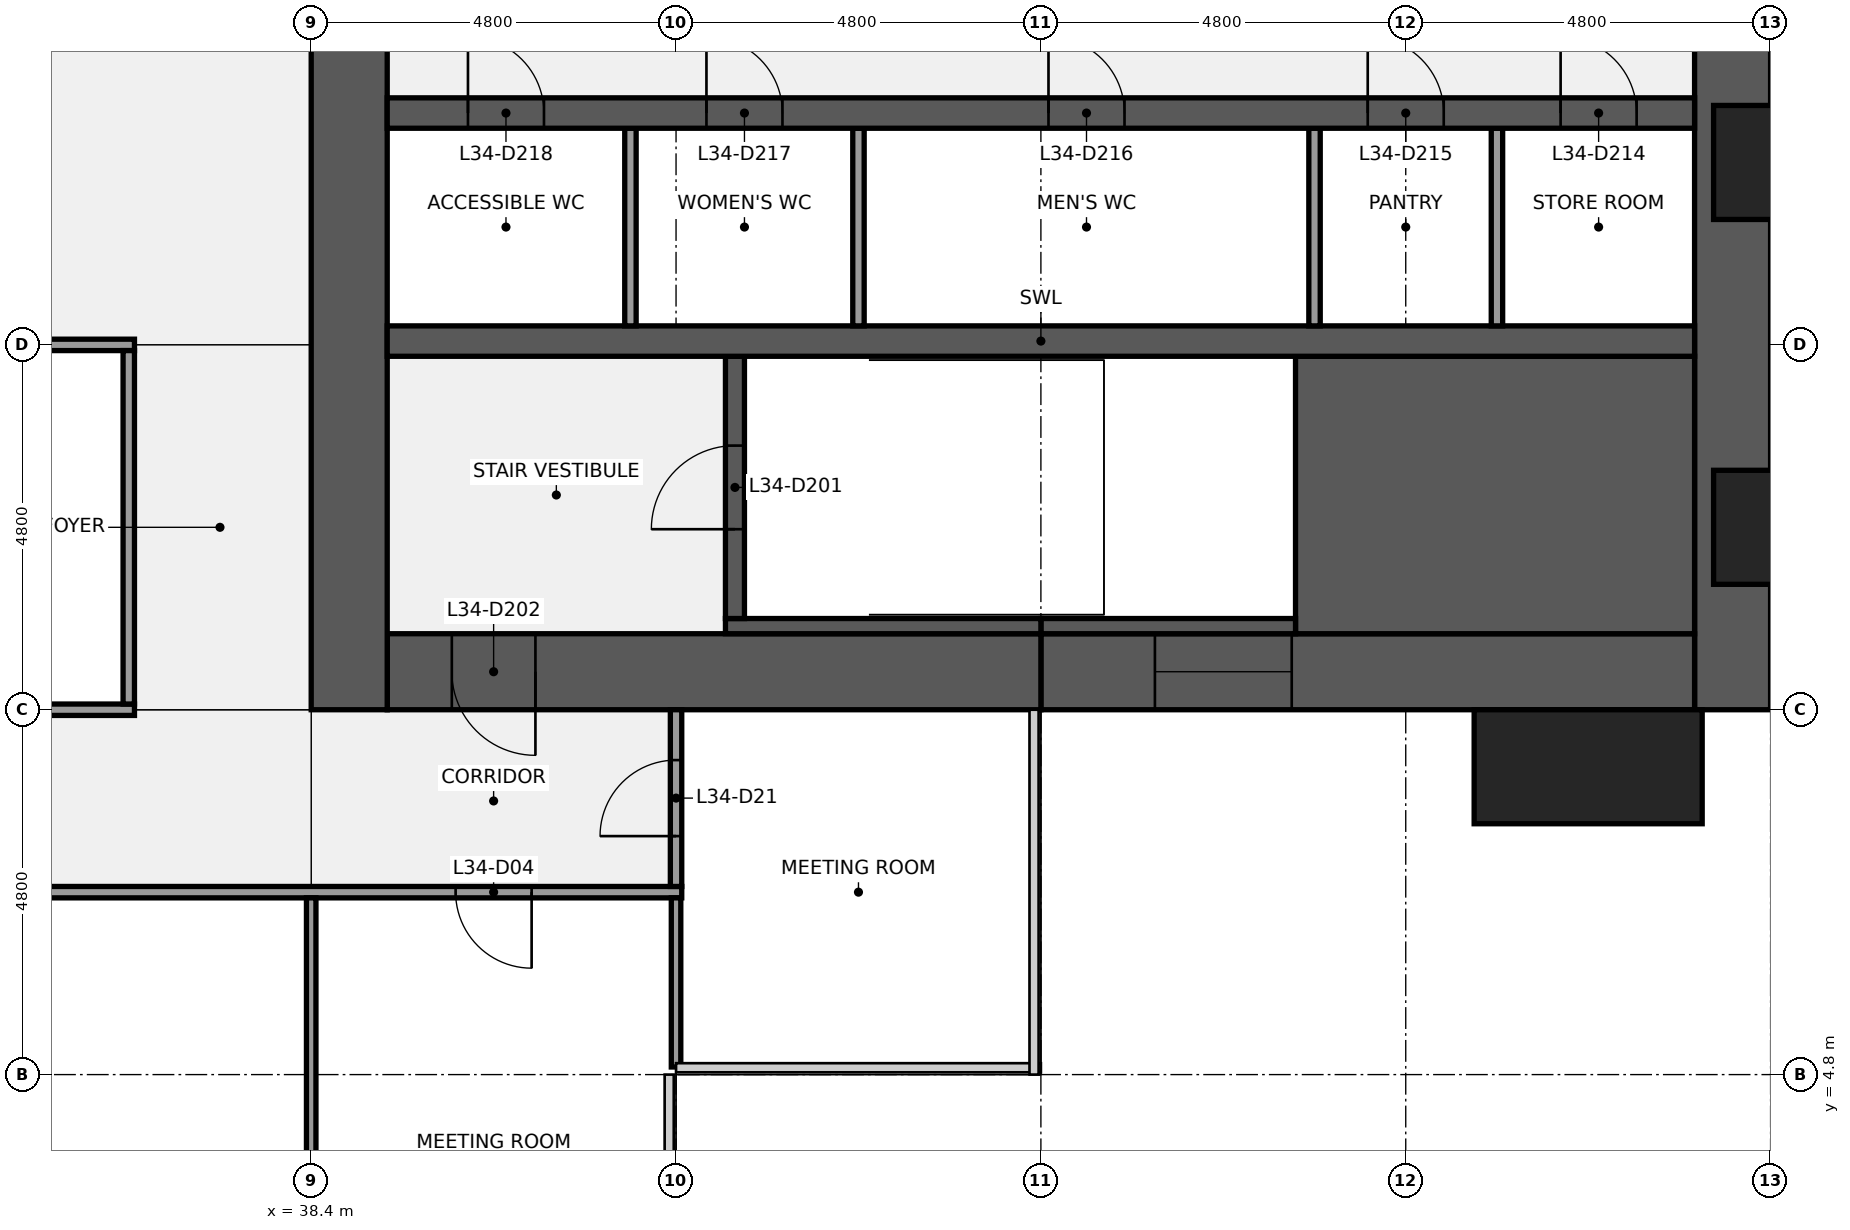
"""IFC4 building model, lengths in metres.
Left out: names, types, materials, properties, quantities, classifications, styles, units other than length and angle.
Written with IfcOpenShell. Run it as: python <this file> out.ifc"""

import sys

from ifc_helpers import new_model, si_unit, direction, frame, frame_2d, origin, origin_2d, place, context, subcontext, project, spatial, rectangle, extrude, element, fill, save


model = new_model("IFC4")
c1 = context("Model", 3, precision=1e-05, world=origin(), true_north=direction((0.0, 1.0)))
c2 = subcontext(c1, "Body", "Model", "MODEL_VIEW")
j1 = project(units=[si_unit("LENGTHUNIT", "METRE"), si_unit("PLANEANGLEUNIT", "RADIAN")], contexts=[c1])
p1 = place(None, origin())
s1 = spatial("IfcSite", under=j1, at=p1, CompositionType="ELEMENT")
p2 = place(p1, origin())
s2 = spatial("IfcBuilding", under=s1, at=p2, CompositionType="ELEMENT")
p3 = place(p2, frame((0.0, 0.0, 156.1)))
s3 = spatial("IfcBuildingStorey", under=s2, at=p3, CompositionType="ELEMENT", Elevation=156.1)
p4 = place(p3, frame((57.1, 38.4, 0.0), z_axis=(0.0, 0.0, 1.0), x_axis=(0.0, -1.0, 0.0)))
e1 = element("IfcWall", 1, at=p4, inside=s3, PredefinedType="SHEAR", context=c2, shape_type="SweptSolid", body=[
    extrude(rectangle(XDim=28.8, YDim=1.0, at=frame_2d((14.4, 0.0))), origin(), (0.0, 0.0, 1.0), 3.84),
])
p5 = place(p4, frame((18.45, 0.0, 0.9)))
e2 = element("IfcOpeningElement", 2, at=p5, cuts=e1, PredefinedType="OPENING", context=c2, shape_type="SweptSolid", body=[
    extrude(rectangle(XDim=1.5, YDim=1.5, at=frame_2d((0.75, 0.75))), frame((0.0, 0.51, 0.0), z_axis=(0.0, -1.0, 0.0), x_axis=(1.0, 0.0, 0.0)), (0.0, 0.0, 1.0), 1.02),
])
p6 = place(p4, frame((8.85, 0.0, 0.9)))
e3 = element("IfcOpeningElement", 3, at=p6, cuts=e1, PredefinedType="OPENING", context=c2, shape_type="SweptSolid", body=[
    extrude(rectangle(XDim=1.5, YDim=1.5, at=frame_2d((0.75, 0.75))), frame((0.0, 0.51, 0.0), z_axis=(0.0, -1.0, 0.0), x_axis=(1.0, 0.0, 0.0)), (0.0, 0.0, 1.0), 1.02),
])
p7 = place(p3, frame((56.6, 10.1, 0.0), z_axis=(0.0, 0.0, 1.0), x_axis=(-1.0, 0.0, 0.0)))
e4 = element("IfcWall", 4, at=p7, inside=s3, PredefinedType="SHEAR", context=c2, shape_type="SweptSolid", body=[
    extrude(rectangle(XDim=8.6, YDim=1.0, at=frame_2d((4.3, 0.0))), origin(), (0.0, 0.0, 1.0), 3.84),
])
p8 = place(p7, frame((5.3, 0.0, 0.9)))
e5 = element("IfcOpeningElement", 5, at=p8, cuts=e4, PredefinedType="OPENING", context=c2, shape_type="SweptSolid", body=[
    extrude(rectangle(XDim=1.8, YDim=1.5, at=frame_2d((0.9, 0.75))), frame((0.0, 0.51, 0.0), z_axis=(0.0, -1.0, 0.0), x_axis=(1.0, 0.0, 0.0)), (0.0, 0.0, 1.0), 1.02),
])
p9 = place(p3, frame((48.0, 10.1, 0.0), z_axis=(0.0, 0.0, 1.0), x_axis=(-1.0, 0.0, 0.0)))
e6 = element("IfcWall", 6, at=p9, inside=s3, PredefinedType="SHEAR", context=c2, shape_type="SweptSolid", body=[
    extrude(rectangle(XDim=8.6, YDim=1.0, at=frame_2d((4.3, 0.0))), origin(), (0.0, 0.0, 1.0), 3.84),
])
p10 = place(p9, frame((6.65, 0.0, 0.0)))
e7 = element("IfcOpeningElement", 7, at=p10, cuts=e6, PredefinedType="OPENING", context=c2, shape_type="SweptSolid", body=[
    extrude(rectangle(XDim=1.1, YDim=2.1, at=frame_2d((0.55, 1.05))), frame((0.0, 0.51, 0.0), z_axis=(0.0, -1.0, 0.0), x_axis=(1.0, 0.0, 0.0)), (0.0, 0.0, 1.0), 1.02),
])
p11 = place(p3, frame((38.9, 9.6, 0.0), z_axis=(0.0, 0.0, 1.0), x_axis=(0.0, 1.0, 0.0)))
e8 = element("IfcWall", 8, at=p11, inside=s3, PredefinedType="SHEAR", context=c2, shape_type="SweptSolid", body=[
    extrude(rectangle(XDim=28.8, YDim=1.0, at=frame_2d((14.4, 0.0))), origin(), (0.0, 0.0, 1.0), 3.84),
])
p12 = place(p11, frame((8.7, 0.0, 0.0)))
e9 = element("IfcOpeningElement", 9, at=p12, cuts=e8, PredefinedType="OPENING", context=c2, shape_type="SweptSolid", body=[
    extrude(rectangle(XDim=1.8, YDim=2.1, at=frame_2d((0.9, 1.05))), frame((0.0, 0.51, 0.0), z_axis=(0.0, -1.0, 0.0), x_axis=(1.0, 0.0, 0.0)), (0.0, 0.0, 1.0), 1.02),
])
p13 = place(p11, frame((18.3, 0.0, 0.0)))
e10 = element("IfcOpeningElement", 10, at=p13, cuts=e8, PredefinedType="OPENING", context=c2, shape_type="SweptSolid", body=[
    extrude(rectangle(XDim=1.8, YDim=2.1, at=frame_2d((0.9, 1.05))), frame((0.0, 0.51, 0.0), z_axis=(0.0, -1.0, 0.0), x_axis=(1.0, 0.0, 0.0)), (0.0, 0.0, 1.0), 1.02),
])
p14 = place(p3, frame((51.35, 12.425, 0.0), z_axis=(0.0, 0.0, 1.0), x_axis=(1.0, 0.0, 0.0)))
e11 = element("IfcWall", 11, at=p14, inside=s3, PredefinedType="SHEAR", context=c2, shape_type="SweptSolid", body=[
    extrude(rectangle(XDim=5.25, YDim=3.65, at=frame_2d((2.625, 0.0))), origin(), (0.0, 0.0, 1.0), 3.84),
])
p15 = place(p3, frame((48.0, 10.7, 0.0), z_axis=(0.0, 0.0, 1.0), x_axis=(1.0, 0.0, 0.0)))
e12 = element("IfcWall", 12, at=p15, inside=s3, PredefinedType="SHEAR", context=c2, shape_type="SweptSolid", body=[
    extrude(rectangle(XDim=3.35, YDim=0.2, at=frame_2d((1.675, 0.0))), origin(), (0.0, 0.0, 1.0), 3.84),
])
p16 = place(p3, frame((43.85, 10.7, 0.0), z_axis=(0.0, 0.0, 1.0), x_axis=(1.0, 0.0, 0.0)))
e13 = element("IfcWall", 13, at=p16, inside=s3, PredefinedType="SHEAR", context=c2, shape_type="SweptSolid", body=[
    extrude(rectangle(XDim=4.15, YDim=0.2, at=frame_2d((2.075, 0.0))), origin(), (0.0, 0.0, 1.0), 3.84),
])
p17 = place(p3, frame((43.975, 10.8, 0.0), z_axis=(0.0, 0.0, 1.0), x_axis=(0.0, 1.0, 0.0)))
e14 = element("IfcWall", 14, at=p17, inside=s3, PredefinedType="SHEAR", context=c2, shape_type="SweptSolid", body=[
    extrude(rectangle(XDim=3.45, YDim=0.25, at=frame_2d((1.725, 0.0))), origin(), (0.0, 0.0, 1.0), 3.84),
])
p18 = place(p17, frame((1.175, 0.0, 0.0)))
e15 = element("IfcOpeningElement", 15, at=p18, cuts=e14, PredefinedType="OPENING", context=c2, shape_type="SweptSolid", body=[
    extrude(rectangle(XDim=1.1, YDim=2.1, at=frame_2d((0.55, 1.05))), frame((0.0, 0.135, 0.0), z_axis=(0.0, -1.0, 0.0), x_axis=(1.0, 0.0, 0.0)), (0.0, 0.0, 1.0), 0.27),
])
p19 = place(p3, frame((39.4, 14.45, 0.0), z_axis=(0.0, 0.0, 1.0), x_axis=(1.0, 0.0, 0.0)))
e16 = element("IfcWall", 16, at=p19, inside=s3, PredefinedType="SHEAR", context=c2, shape_type="SweptSolid", body=[
    extrude(rectangle(XDim=17.2, YDim=0.4, at=frame_2d((8.6, 0.0))), origin(), (0.0, 0.0, 1.0), 3.84),
])
for number, where, z_axis, x_axis in (
    (17, (54.0, 14.65, 0.0), (0.0, 0.0, 1.0), (0.0, 1.0, 0.0)),
    (18, (51.6, 14.65, 0.0), (0.0, 0.0, 1.0), (0.0, 1.0, 0.0)),
    (19, (45.6, 14.65, 0.0), (0.0, 0.0, 1.0), (0.0, 1.0, 0.0)),
    (20, (42.6, 14.65, 0.0), (0.0, 0.0, 1.0), (0.0, 1.0, 0.0)),
):
    element("IfcWall", number, at=place(p3, frame(where, z_axis=z_axis, x_axis=x_axis)), inside=s3, PredefinedType="PARTITIONING", context=c2, shape_type="SweptSolid", body=[
        extrude(rectangle(XDim=2.6, YDim=0.15, at=frame_2d((1.3, 0.0))), origin(), (0.0, 0.0, 1.0), 3.84),
    ])
p20 = place(p3, frame((39.4, 17.45, 0.0), z_axis=(0.0, 0.0, 1.0), x_axis=(1.0, 0.0, 0.0)))
e21 = element("IfcWall", 21, at=p20, inside=s3, PredefinedType="SHEAR", context=c2, shape_type="SweptSolid", body=[
    extrude(rectangle(XDim=17.2, YDim=0.4, at=frame_2d((8.6, 0.0))), origin(), (0.0, 0.0, 1.0), 3.84),
])
p21 = place(p20, frame((15.438, 0.0, 0.0)))
e22 = element("IfcOpeningElement", 22, at=p21, cuts=e21, PredefinedType="OPENING", context=c2, shape_type="SweptSolid", body=[
    extrude(rectangle(XDim=1.0, YDim=2.1, at=frame_2d((0.5, 1.05))), frame((0.0, 0.21, 0.0), z_axis=(0.0, -1.0, 0.0), x_axis=(1.0, 0.0, 0.0)), (0.0, 0.0, 1.0), 0.42),
])
p22 = place(p20, frame((12.9, 0.0, 0.0)))
e23 = element("IfcOpeningElement", 23, at=p22, cuts=e21, PredefinedType="OPENING", context=c2, shape_type="SweptSolid", body=[
    extrude(rectangle(XDim=1.0, YDim=2.1, at=frame_2d((0.5, 1.05))), frame((0.0, 0.21, 0.0), z_axis=(0.0, -1.0, 0.0), x_axis=(1.0, 0.0, 0.0)), (0.0, 0.0, 1.0), 0.42),
])
p23 = place(p20, frame((8.7, 0.0, 0.0)))
e24 = element("IfcOpeningElement", 24, at=p23, cuts=e21, PredefinedType="OPENING", context=c2, shape_type="SweptSolid", body=[
    extrude(rectangle(XDim=1.0, YDim=2.1, at=frame_2d((0.5, 1.05))), frame((0.0, 0.21, 0.0), z_axis=(0.0, -1.0, 0.0), x_axis=(1.0, 0.0, 0.0)), (0.0, 0.0, 1.0), 0.42),
])
p24 = place(p20, frame((4.2, 0.0, 0.0)))
e25 = element("IfcOpeningElement", 25, at=p24, cuts=e21, PredefinedType="OPENING", context=c2, shape_type="SweptSolid", body=[
    extrude(rectangle(XDim=1.0, YDim=2.1, at=frame_2d((0.5, 1.05))), frame((0.0, 0.21, 0.0), z_axis=(0.0, -1.0, 0.0), x_axis=(1.0, 0.0, 0.0)), (0.0, 0.0, 1.0), 0.42),
])
p25 = place(p20, frame((1.062, 0.0, 0.0)))
e26 = element("IfcOpeningElement", 26, at=p25, cuts=e21, PredefinedType="OPENING", context=c2, shape_type="SweptSolid", body=[
    extrude(rectangle(XDim=1.0, YDim=2.1, at=frame_2d((0.5, 1.05))), frame((0.0, 0.21, 0.0), z_axis=(0.0, -1.0, 0.0), x_axis=(1.0, 0.0, 0.0)), (0.0, 0.0, 1.0), 0.42),
])
p26 = place(p3, frame((14.325, 7.2, 0.0), z_axis=(0.0, 0.0, 1.0), x_axis=(1.0, 0.0, 0.0)))
e27 = element("IfcWall", 27, at=p26, inside=s3, PredefinedType="PARTITIONING", context=c2, shape_type="SweptSolid", body=[
    extrude(rectangle(XDim=28.95, YDim=0.15, at=frame_2d((14.475, 0.0))), origin(), (0.0, 0.0, 1.0), 2.936),
])
p27 = place(p26, frame((1.975, 0.0, 0.0)))
e28 = element("IfcOpeningElement", 28, at=p27, cuts=e27, PredefinedType="OPENING", context=c2, shape_type="SweptSolid", body=[
    extrude(rectangle(XDim=1.0, YDim=2.1, at=frame_2d((0.5, 1.05))), frame((0.0, 0.085, 0.0), z_axis=(0.0, -1.0, 0.0), x_axis=(1.0, 0.0, 0.0)), (0.0, 0.0, 1.0), 0.17),
])
p28 = place(p26, frame((9.175, 0.0, 0.0)))
e29 = element("IfcOpeningElement", 29, at=p28, cuts=e27, PredefinedType="OPENING", context=c2, shape_type="SweptSolid", body=[
    extrude(rectangle(XDim=1.0, YDim=2.1, at=frame_2d((0.5, 1.05))), frame((0.0, 0.085, 0.0), z_axis=(0.0, -1.0, 0.0), x_axis=(1.0, 0.0, 0.0)), (0.0, 0.0, 1.0), 0.17),
])
p29 = place(p26, frame((18.775, 0.0, 0.0)))
e30 = element("IfcOpeningElement", 30, at=p29, cuts=e27, PredefinedType="OPENING", context=c2, shape_type="SweptSolid", body=[
    extrude(rectangle(XDim=1.0, YDim=2.1, at=frame_2d((0.5, 1.05))), frame((0.0, 0.085, 0.0), z_axis=(0.0, -1.0, 0.0), x_axis=(1.0, 0.0, 0.0)), (0.0, 0.0, 1.0), 0.17),
])
p30 = place(p26, frame((25.975, 0.0, 0.0)))
e31 = element("IfcOpeningElement", 31, at=p30, cuts=e27, PredefinedType="OPENING", context=c2, shape_type="SweptSolid", body=[
    extrude(rectangle(XDim=1.0, YDim=2.1, at=frame_2d((0.5, 1.05))), frame((0.0, 0.085, 0.0), z_axis=(0.0, -1.0, 0.0), x_axis=(1.0, 0.0, 0.0)), (0.0, 0.0, 1.0), 0.17),
])
p31 = place(p3, frame((21.525, 9.6, 0.0), z_axis=(0.0, 0.0, 1.0), x_axis=(1.0, 0.0, 0.0)))
e32 = element("IfcWall", 32, at=p31, inside=s3, PredefinedType="PARTITIONING", context=c2, shape_type="SweptSolid", body=[
    extrude(rectangle(XDim=14.55, YDim=0.15, at=frame_2d((7.275, 0.0))), origin(), (0.0, 0.0, 1.0), 2.936),
])
p32 = place(p31, frame((3.175, 0.0, 0.0)))
e33 = element("IfcOpeningElement", 33, at=p32, cuts=e32, PredefinedType="OPENING", context=c2, shape_type="SweptSolid", body=[
    extrude(rectangle(XDim=1.0, YDim=2.1, at=frame_2d((0.5, 1.05))), frame((0.0, 0.085, 0.0), z_axis=(0.0, -1.0, 0.0), x_axis=(1.0, 0.0, 0.0)), (0.0, 0.0, 1.0), 0.17),
])
p33 = place(p31, frame((10.375, 0.0, 0.0)))
e34 = element("IfcOpeningElement", 34, at=p33, cuts=e32, PredefinedType="OPENING", context=c2, shape_type="SweptSolid", body=[
    extrude(rectangle(XDim=1.0, YDim=2.1, at=frame_2d((0.5, 1.05))), frame((0.0, 0.085, 0.0), z_axis=(0.0, -1.0, 0.0), x_axis=(1.0, 0.0, 0.0)), (0.0, 0.0, 1.0), 0.17),
])
p34 = place(p3, frame((31.275, 14.4, 0.0), z_axis=(0.0, 0.0, 1.0), x_axis=(1.0, 0.0, 0.0)))
e35 = element("IfcWall", 35, at=p34, inside=s3, PredefinedType="PARTITIONING", context=c2, shape_type="SweptSolid", body=[
    extrude(rectangle(XDim=4.8, YDim=0.15, at=frame_2d((2.4, 0.0))), origin(), (0.0, 0.0, 1.0), 2.936),
])
p35 = place(p3, frame((36.0, 9.675, 0.0), z_axis=(0.0, 0.0, 1.0), x_axis=(0.0, 1.0, 0.0)))
e36 = element("IfcWall", 36, at=p35, inside=s3, PredefinedType="PARTITIONING", context=c2, shape_type="SweptSolid", body=[
    extrude(rectangle(XDim=4.65, YDim=0.15, at=frame_2d((2.325, 0.0))), origin(), (0.0, 0.0, 1.0), 2.936),
])
p36 = place(p3, frame((38.4, 0.6, 0.0), z_axis=(0.0, 0.0, 1.0), x_axis=(0.0, 1.0, 0.0)))
e37 = element("IfcWall", 37, at=p36, inside=s3, PredefinedType="PARTITIONING", context=c2, shape_type="SweptSolid", body=[
    extrude(rectangle(XDim=6.525, YDim=0.125, at=frame_2d((3.262, 0.0))), origin(), (0.0, 0.0, 1.0), 2.936),
])
p37 = place(p3, frame((43.2, 4.9, 0.0), z_axis=(0.0, 0.0, 1.0), x_axis=(0.0, 1.0, 0.0)))
e38 = element("IfcWall", 38, at=p37, inside=s3, PredefinedType="PARTITIONING", context=c2, shape_type="SweptSolid", body=[
    extrude(rectangle(XDim=2.225, YDim=0.125, at=frame_2d((1.113, 0.0))), origin(), (0.0, 0.0, 1.0), 2.936),
])
p38 = place(p3, frame((43.2, 7.275, 0.0), z_axis=(0.0, 0.0, 1.0), x_axis=(0.0, 1.0, 0.0)))
e39 = element("IfcWall", 39, at=p38, inside=s3, PredefinedType="PARTITIONING", context=c2, shape_type="SweptSolid", body=[
    extrude(rectangle(XDim=2.325, YDim=0.15, at=frame_2d((1.163, 0.0))), origin(), (0.0, 0.0, 1.0), 2.936),
])
p39 = place(p38, frame((0.663, 0.0, 0.0)))
e40 = element("IfcOpeningElement", 40, at=p39, cuts=e39, PredefinedType="OPENING", context=c2, shape_type="SweptSolid", body=[
    extrude(rectangle(XDim=1.0, YDim=2.1, at=frame_2d((0.5, 1.05))), frame((0.0, 0.085, 0.0), z_axis=(0.0, -1.0, 0.0), x_axis=(1.0, 0.0, 0.0)), (0.0, 0.0, 1.0), 0.17),
])
p40 = place(p3, frame((55.2, 8.85, 0.0), z_axis=(0.0, 0.0, 1.0), x_axis=(1.0, 0.0, 0.0)))
e41 = element("IfcColumn", 41, at=p40, inside=s3, PredefinedType="PILASTER", context=c2, shape_type="SweptSolid", body=[
    extrude(rectangle(XDim=3.0, YDim=1.5, at=origin_2d()), origin(), (0.0, 0.0, 1.0), 4.0),
])
p41 = place(p18, origin())
e42 = element("IfcDoor", 42, at=p41, inside=s3, OperationType="SINGLE_SWING_LEFT", PredefinedType="DOOR", context=c2, shape_type="SweptSolid", body=[
    extrude(rectangle(XDim=1.1, YDim=2.1, at=frame_2d((0.55, 1.05))), frame((0.0, 0.025, 0.0), z_axis=(0.0, -1.0, 0.0), x_axis=(1.0, 0.0, 0.0)), (0.0, 0.0, 1.0), 0.05),
])
fill(e15, e42)
p42 = place(p10, origin())
e43 = element("IfcDoor", 43, at=p42, inside=s3, OperationType="SINGLE_SWING_LEFT", PredefinedType="DOOR", context=c2, shape_type="SweptSolid", body=[
    extrude(rectangle(XDim=1.1, YDim=2.1, at=frame_2d((0.55, 1.05))), frame((0.0, 0.025, 0.0), z_axis=(0.0, -1.0, 0.0), x_axis=(1.0, 0.0, 0.0)), (0.0, 0.0, 1.0), 0.05),
])
fill(e7, e43)
p43 = place(p21, origin())
e44 = element("IfcDoor", 44, at=p43, inside=s3, OperationType="SINGLE_SWING_LEFT", PredefinedType="DOOR", context=c2, shape_type="SweptSolid", body=[
    extrude(rectangle(XDim=1.0, YDim=2.1, at=frame_2d((0.5, 1.05))), frame((0.0, 0.025, 0.0), z_axis=(0.0, -1.0, 0.0), x_axis=(1.0, 0.0, 0.0)), (0.0, 0.0, 1.0), 0.05),
])
fill(e22, e44)
p44 = place(p22, origin())
e45 = element("IfcDoor", 45, at=p44, inside=s3, OperationType="SINGLE_SWING_LEFT", PredefinedType="DOOR", context=c2, shape_type="SweptSolid", body=[
    extrude(rectangle(XDim=1.0, YDim=2.1, at=frame_2d((0.5, 1.05))), frame((0.0, 0.025, 0.0), z_axis=(0.0, -1.0, 0.0), x_axis=(1.0, 0.0, 0.0)), (0.0, 0.0, 1.0), 0.05),
])
fill(e23, e45)
p45 = place(p23, origin())
e46 = element("IfcDoor", 46, at=p45, inside=s3, OperationType="SINGLE_SWING_LEFT", PredefinedType="DOOR", context=c2, shape_type="SweptSolid", body=[
    extrude(rectangle(XDim=1.0, YDim=2.1, at=frame_2d((0.5, 1.05))), frame((0.0, 0.025, 0.0), z_axis=(0.0, -1.0, 0.0), x_axis=(1.0, 0.0, 0.0)), (0.0, 0.0, 1.0), 0.05),
])
fill(e24, e46)
p46 = place(p24, origin())
e47 = element("IfcDoor", 47, at=p46, inside=s3, OperationType="SINGLE_SWING_LEFT", PredefinedType="DOOR", context=c2, shape_type="SweptSolid", body=[
    extrude(rectangle(XDim=1.0, YDim=2.1, at=frame_2d((0.5, 1.05))), frame((0.0, 0.025, 0.0), z_axis=(0.0, -1.0, 0.0), x_axis=(1.0, 0.0, 0.0)), (0.0, 0.0, 1.0), 0.05),
])
fill(e25, e47)
p47 = place(p25, origin())
e48 = element("IfcDoor", 48, at=p47, inside=s3, OperationType="SINGLE_SWING_LEFT", PredefinedType="DOOR", context=c2, shape_type="SweptSolid", body=[
    extrude(rectangle(XDim=1.0, YDim=2.1, at=frame_2d((0.5, 1.05))), frame((0.0, 0.025, 0.0), z_axis=(0.0, -1.0, 0.0), x_axis=(1.0, 0.0, 0.0)), (0.0, 0.0, 1.0), 0.05),
])
fill(e26, e48)
p48 = place(p8, origin())
e49 = element("IfcWindow", 49, at=p48, inside=s3, PartitioningType="SINGLE_PANEL", PredefinedType="WINDOW", context=c2, shape_type="SweptSolid", body=[
    extrude(rectangle(XDim=1.8, YDim=1.5, at=frame_2d((0.9, 0.75))), frame((0.0, 0.03, 0.0), z_axis=(0.0, -1.0, 0.0), x_axis=(1.0, 0.0, 0.0)), (0.0, 0.0, 1.0), 0.06),
])
fill(e5, e49)
p49 = place(p30, origin())
e50 = element("IfcDoor", 50, at=p49, inside=s3, OperationType="SINGLE_SWING_RIGHT", PredefinedType="DOOR", context=c2, shape_type="SweptSolid", body=[
    extrude(rectangle(XDim=1.0, YDim=2.1, at=frame_2d((0.5, 1.05))), frame((0.0, 0.025, 0.0), z_axis=(0.0, -1.0, 0.0), x_axis=(1.0, 0.0, 0.0)), (0.0, 0.0, 1.0), 0.05),
])
fill(e31, e50)
p50 = place(p39, origin())
e51 = element("IfcDoor", 51, at=p50, inside=s3, OperationType="SINGLE_SWING_LEFT", PredefinedType="DOOR", context=c2, shape_type="SweptSolid", body=[
    extrude(rectangle(XDim=1.0, YDim=2.1, at=frame_2d((0.5, 1.05))), frame((0.0, 0.025, 0.0), z_axis=(0.0, -1.0, 0.0), x_axis=(1.0, 0.0, 0.0)), (0.0, 0.0, 1.0), 0.05),
])
fill(e40, e51)
save(model, sys.argv[1])
